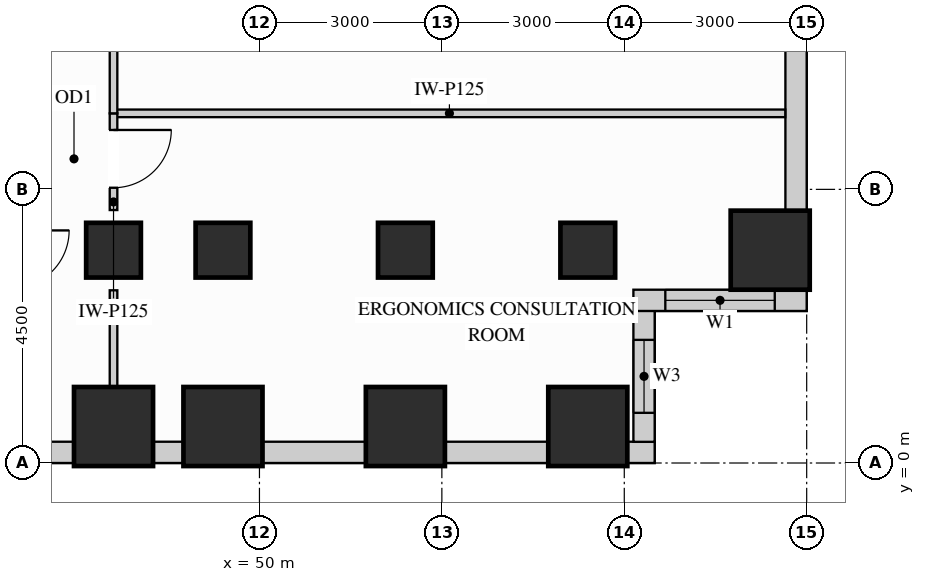
"""IFC4 building model, lengths in metres.
Left out: names, types, materials, properties, quantities, classifications, styles, units other than length and angle.
Written with IfcOpenShell. Run it as: python <this file> out.ifc"""

import sys

from ifc_helpers import new_model, si_unit, direction, frame, frame_2d, origin, origin_2d, place, context, subcontext, project, spatial, rectangle, extrude, source, transform, mapped, element, fill, save


model = new_model("IFC4")
c1 = context("Model", 3, precision=1e-05, world=origin(), true_north=direction((0.0, 1.0)))
c2 = subcontext(c1, "Body", "Model", "MODEL_VIEW")
j1 = project(units=[si_unit("LENGTHUNIT", "METRE"), si_unit("PLANEANGLEUNIT", "RADIAN")], contexts=[c1])
p1 = place(None, origin())
s1 = spatial("IfcSite", under=j1, at=p1, CompositionType="ELEMENT")
p2 = place(p1, origin())
s2 = spatial("IfcBuilding", under=s1, at=p2, CompositionType="ELEMENT")
p3 = place(p2, frame((0.0, 0.0, 33.3)))
s3 = spatial("IfcBuildingStorey", under=s2, at=p3, CompositionType="ELEMENT", Elevation=33.3)
m1 = source(origin(), c2, "Body", "SweptSolid", [
    extrude(rectangle(XDim=0.9, YDim=0.9, at=origin_2d()), origin(), (0.0, 0.0, 1.0), 3.38),
])
for number, where, z_axis, x_axis in (
    (1, (47.6, 3.5, 0.0), (0.0, 0.0, 1.0), (1.0, 0.0, 0.0)),
    (2, (49.4, 3.5, 0.0), (0.0, 0.0, 1.0), (1.0, 0.0, 0.0)),
    (3, (52.4, 3.5, 0.0), (0.0, 0.0, 1.0), (1.0, 0.0, 0.0)),
    (4, (55.4, 3.5, 0.0), (0.0, 0.0, 1.0), (1.0, 0.0, 0.0)),
):
    element("IfcColumn", number, at=place(p3, frame(where, z_axis=z_axis, x_axis=x_axis)), inside=s3, PredefinedType="COLUMN", context=c2, shape_type="MappedRepresentation", body=[
        mapped(m1, transform((0.0, 0.0, 0.0), x_axis=(1.0, 0.0, 0.0), y_axis=(0.0, 1.0, 0.0), z_axis=(0.0, 0.0, 1.0))),
    ])
m2 = source(origin(), c2, "Body", "SweptSolid", [
    extrude(rectangle(XDim=1.3, YDim=1.3, at=origin_2d()), origin(), (0.0, 0.0, 1.0), 3.38),
])
for number, where, z_axis, x_axis in (
    (5, (58.4, 3.5, 0.0), (0.0, 0.0, 1.0), (1.0, 0.0, 0.0)),
    (6, (47.6, 0.6, 0.0), (0.0, 0.0, 1.0), (1.0, 0.0, 0.0)),
    (7, (49.4, 0.6, 0.0), (0.0, 0.0, 1.0), (1.0, 0.0, 0.0)),
    (8, (52.4, 0.6, 0.0), (0.0, 0.0, 1.0), (1.0, 0.0, 0.0)),
    (9, (55.4, 0.6, 0.0), (0.0, 0.0, 1.0), (1.0, 0.0, 0.0)),
):
    element("IfcColumn", number, at=place(p3, frame(where, z_axis=z_axis, x_axis=x_axis)), inside=s3, PredefinedType="COLUMN", context=c2, shape_type="MappedRepresentation", body=[
        mapped(m2, transform((0.0, 0.0, 0.0), x_axis=(1.0, 0.0, 0.0), y_axis=(0.0, 1.0, 0.0), z_axis=(0.0, 0.0, 1.0))),
    ])
p4 = place(p3, frame((40.648, 0.175, 0.0), z_axis=(0.0, 0.0, 1.0), x_axis=(1.0, 0.0, 0.0)))
e10 = element("IfcWall", 10, at=p4, inside=s3, PredefinedType="SOLIDWALL", context=c2, shape_type="SweptSolid", body=[
    extrude(rectangle(XDim=6.304, YDim=0.35, at=frame_2d((3.152, 0.0))), origin(), (0.0, 0.0, 1.0), 2.51),
])
p5 = place(p4, frame((0.687, 0.0, 0.78)))
e11 = element("IfcOpeningElement", 11, at=p5, cuts=e10, PredefinedType="OPENING", context=c2, shape_type="SweptSolid", body=[
    extrude(rectangle(XDim=1.8, YDim=1.55, at=frame_2d((0.9, 0.775))), frame((0.0, 0.185, 0.0), z_axis=(0.0, -1.0, 0.0), x_axis=(1.0, 0.0, 0.0)), (0.0, 0.0, 1.0), 0.37),
])
p6 = place(p4, frame((2.855, 0.0, 0.78)))
e12 = element("IfcOpeningElement", 12, at=p6, cuts=e10, PredefinedType="OPENING", context=c2, shape_type="SweptSolid", body=[
    extrude(rectangle(XDim=1.8, YDim=1.55, at=frame_2d((0.9, 0.775))), frame((0.0, 0.185, 0.0), z_axis=(0.0, -1.0, 0.0), x_axis=(1.0, 0.0, 0.0)), (0.0, 0.0, 1.0), 0.37),
])
m3 = source(origin(), c2, "Body", "SweptSolid", [
    extrude(rectangle(XDim=0.504, YDim=0.35, at=frame_2d((0.252, 0.0))), origin(), (0.0, 0.0, 1.0), 3.365),
])
p7 = place(p3, frame((48.248, 0.175, 0.0), z_axis=(0.0, 0.0, 1.0), x_axis=(1.0, 0.0, 0.0)))
e13 = element("IfcWall", 13, at=p7, inside=s3, PredefinedType="SOLIDWALL", context=c2, shape_type="MappedRepresentation", body=[
    mapped(m3, transform((0.0, 0.0, 0.0), x_axis=(1.0, 0.0, 0.0), y_axis=(0.0, 1.0, 0.0), z_axis=(0.0, 0.0, 1.0))),
])
m4 = source(origin(), c2, "Body", "SweptSolid", [
    extrude(rectangle(XDim=1.704, YDim=0.35, at=frame_2d((0.852, 0.0))), origin(), (0.0, 0.0, 1.0), 2.51),
])
for number, where, z_axis, x_axis in (
    (14, (50.048, 0.175, 0.0), (0.0, 0.0, 1.0), (1.0, 0.0, 0.0)),
    (15, (53.048, 0.175, 0.0), (0.0, 0.0, 1.0), (1.0, 0.0, 0.0)),
):
    element("IfcWall", number, at=place(p3, frame(where, z_axis=z_axis, x_axis=x_axis)), inside=s3, PredefinedType="SOLIDWALL", context=c2, shape_type="MappedRepresentation", body=[
        mapped(m4, transform((0.0, 0.0, 0.0), x_axis=(1.0, 0.0, 0.0), y_axis=(0.0, 1.0, 0.0), z_axis=(0.0, 0.0, 1.0))),
    ])
m5 = source(origin(), c2, "Body", "SweptSolid", [
    extrude(rectangle(XDim=0.452, YDim=0.35, at=frame_2d((0.226, 0.0))), origin(), (0.0, 0.0, 1.0), 3.365),
])
p8 = place(p3, frame((56.048, 0.175, 0.0), z_axis=(0.0, 0.0, 1.0), x_axis=(1.0, 0.0, 0.0)))
e16 = element("IfcWall", 16, at=p8, inside=s3, PredefinedType="SOLIDWALL", context=c2, shape_type="MappedRepresentation", body=[
    mapped(m5, transform((0.0, 0.0, 0.0), x_axis=(1.0, 0.0, 0.0), y_axis=(0.0, 1.0, 0.0), z_axis=(0.0, 0.0, 1.0))),
])
p9 = place(p3, frame((56.325, 0.348, 0.0), z_axis=(0.0, 0.0, 1.0), x_axis=(0.0, 1.0, 0.0)))
e17 = element("IfcWall", 17, at=p9, inside=s3, PredefinedType="SOLIDWALL", context=c2, shape_type="SweptSolid", body=[
    extrude(rectangle(XDim=2.154, YDim=0.35, at=frame_2d((1.077, 0.0))), origin(), (0.0, 0.0, 1.0), 3.365),
])
p10 = place(p9, frame((0.477, 0.0, 0.78)))
e18 = element("IfcOpeningElement", 18, at=p10, cuts=e17, PredefinedType="OPENING", context=c2, shape_type="SweptSolid", body=[
    extrude(rectangle(XDim=1.2, YDim=2.1, at=frame_2d((0.6, 1.05))), frame((0.0, 0.185, 0.0), z_axis=(0.0, -1.0, 0.0), x_axis=(1.0, 0.0, 0.0)), (0.0, 0.0, 1.0), 0.37),
])
p11 = place(p3, frame((56.15, 2.675, 0.0), z_axis=(0.0, 0.0, 1.0), x_axis=(1.0, 0.0, 0.0)))
e19 = element("IfcWall", 19, at=p11, inside=s3, PredefinedType="SOLIDWALL", context=c2, shape_type="SweptSolid", body=[
    extrude(rectangle(XDim=2.85, YDim=0.35, at=frame_2d((1.425, 0.0))), origin(), (0.0, 0.0, 1.0), 3.365),
])
p12 = place(p11, frame((0.525, 0.0, 0.78)))
e20 = element("IfcOpeningElement", 20, at=p12, cuts=e19, PredefinedType="OPENING", context=c2, shape_type="SweptSolid", body=[
    extrude(rectangle(XDim=1.8, YDim=2.1, at=frame_2d((0.9, 1.05))), frame((0.0, 0.185, 0.0), z_axis=(0.0, -1.0, 0.0), x_axis=(1.0, 0.0, 0.0)), (0.0, 0.0, 1.0), 0.37),
])
m6 = source(origin(), c2, "Body", "SweptSolid", [
    extrude(rectangle(XDim=3.204, YDim=0.35, at=frame_2d((1.602, 0.0))), origin(), (0.0, 0.0, 1.0), 2.51),
])
p13 = place(p3, frame((58.825, 4.148, 0.0), z_axis=(0.0, 0.0, 1.0), x_axis=(0.0, 1.0, 0.0)))
e21 = element("IfcWall", 21, at=p13, inside=s3, PredefinedType="SOLIDWALL", context=c2, shape_type="MappedRepresentation", body=[
    mapped(m6, transform((0.0, 0.0, 0.0), x_axis=(1.0, 0.0, 0.0), y_axis=(0.0, 1.0, 0.0), z_axis=(0.0, 0.0, 1.0))),
])
m7 = source(origin(), c2, "Body", "SweptSolid", [
    extrude(rectangle(XDim=11.048, YDim=0.125, at=frame_2d((5.524, 0.0))), origin(), (0.0, 0.0, 1.0), 3.365),
])
p14 = place(p3, frame((47.6, 5.75, 0.0), z_axis=(0.0, 0.0, 1.0), x_axis=(1.0, 0.0, 0.0)))
e22 = element("IfcWall", 22, at=p14, inside=s3, PredefinedType="PARTITIONING", context=c2, shape_type="MappedRepresentation", body=[
    mapped(m7, transform((0.0, 0.0, 0.0), x_axis=(1.0, 0.0, 0.0), y_axis=(0.0, 1.0, 0.0), z_axis=(0.0, 0.0, 1.0))),
])
p15 = place(p3, frame((47.6, 4.16, 0.0), z_axis=(0.0, 0.0, 1.0), x_axis=(0.0, 1.0, 0.0)))
e23 = element("IfcWall", 23, at=p15, inside=s3, PredefinedType="PARTITIONING", context=c2, shape_type="SweptSolid", body=[
    extrude(rectangle(XDim=1.59, YDim=0.125, at=frame_2d((0.795, 0.0))), origin(), (0.0, 0.0, 1.0), 2.67),
])
p16 = place(p15, frame((0.367, 0.0, 0.0)))
e24 = element("IfcOpeningElement", 24, at=p16, cuts=e23, PredefinedType="OPENING", context=c2, shape_type="SweptSolid", body=[
    extrude(rectangle(XDim=0.95, YDim=2.15, at=frame_2d((0.475, 1.075))), frame((0.0, 0.073, 0.0), z_axis=(0.0, -1.0, 0.0), x_axis=(1.0, 0.0, 0.0)), (0.0, 0.0, 1.0), 0.145),
])
m8 = source(origin(), c2, "Body", "SweptSolid", [
    extrude(rectangle(XDim=1.58, YDim=0.125, at=frame_2d((0.79, 0.0))), origin(), (0.0, 0.0, 1.0), 2.67),
])
p17 = place(p3, frame((47.6, 1.26, 0.0), z_axis=(0.0, 0.0, 1.0), x_axis=(0.0, 1.0, 0.0)))
e25 = element("IfcWall", 25, at=p17, inside=s3, PredefinedType="PARTITIONING", context=c2, shape_type="MappedRepresentation", body=[
    mapped(m8, transform((0.0, 0.0, 0.0), x_axis=(1.0, 0.0, 0.0), y_axis=(0.0, 1.0, 0.0), z_axis=(0.0, 0.0, 1.0))),
])
m9 = source(origin(), c2, "Body", "SweptSolid", [
    extrude(rectangle(XDim=1.59, YDim=0.125, at=frame_2d((0.795, 0.0))), origin(), (0.0, 0.0, 1.0), 2.67),
])
p18 = place(p3, frame((47.6, 5.75, 0.0), z_axis=(0.0, 0.0, 1.0), x_axis=(0.0, 1.0, 0.0)))
e26 = element("IfcWall", 26, at=p18, inside=s3, PredefinedType="PARTITIONING", context=c2, shape_type="MappedRepresentation", body=[
    mapped(m9, transform((0.0, 0.0, 0.0), x_axis=(1.0, 0.0, 0.0), y_axis=(0.0, 1.0, 0.0), z_axis=(0.0, 0.0, 1.0))),
])
m10 = source(origin(), c2, "Body", "SweptSolid", [
    extrude(rectangle(XDim=0.95, YDim=2.15, at=frame_2d((0.475, 1.075))), frame((0.0, 0.025, 0.0), z_axis=(0.0, -1.0, 0.0), x_axis=(1.0, 0.0, 0.0)), (0.0, 0.0, 1.0), 0.05),
])
p19 = place(p16, origin())
e27 = element("IfcDoor", 27, at=p19, inside=s3, OperationType="SINGLE_SWING_RIGHT", PredefinedType="DOOR", context=c2, shape_type="MappedRepresentation", body=[
    mapped(m10, transform((0.0, 0.0, 0.0), x_axis=(1.0, 0.0, 0.0), y_axis=(0.0, 1.0, 0.0), z_axis=(0.0, 0.0, 1.0))),
])
fill(e24, e27)
m11 = source(origin(), c2, "Body", "SweptSolid", [
    extrude(rectangle(XDim=1.8, YDim=2.1, at=frame_2d((0.9, 1.05))), frame((0.0, 0.03, 0.0), z_axis=(0.0, -1.0, 0.0), x_axis=(1.0, 0.0, 0.0)), (0.0, 0.0, 1.0), 0.06),
])
p20 = place(p12, origin())
e28 = element("IfcWindow", 28, at=p20, inside=s3, PartitioningType="SINGLE_PANEL", PredefinedType="WINDOW", context=c2, shape_type="MappedRepresentation", body=[
    mapped(m11, transform((0.0, 0.0, 0.0), x_axis=(1.0, 0.0, 0.0), y_axis=(0.0, 1.0, 0.0), z_axis=(0.0, 0.0, 1.0))),
])
fill(e20, e28)
m12 = source(origin(), c2, "Body", "SweptSolid", [
    extrude(rectangle(XDim=1.2, YDim=2.1, at=frame_2d((0.6, 1.05))), frame((0.0, 0.03, 0.0), z_axis=(0.0, -1.0, 0.0), x_axis=(1.0, 0.0, 0.0)), (0.0, 0.0, 1.0), 0.06),
])
p21 = place(p10, origin())
e29 = element("IfcWindow", 29, at=p21, inside=s3, PartitioningType="SINGLE_PANEL", PredefinedType="WINDOW", context=c2, shape_type="MappedRepresentation", body=[
    mapped(m12, transform((0.0, 0.0, 0.0), x_axis=(1.0, 0.0, 0.0), y_axis=(0.0, 1.0, 0.0), z_axis=(0.0, 0.0, 1.0))),
])
fill(e18, e29)
save(model, sys.argv[1])
